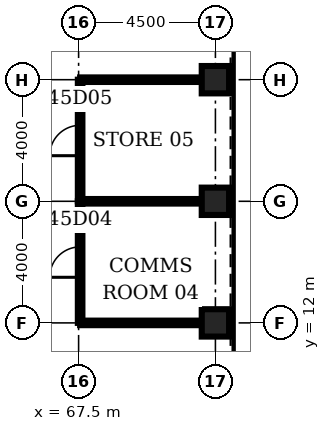
"""IFC4 building model, lengths in metres.
Left out: names, types, materials, properties, quantities, classifications, styles, units other than length and angle.
Written with IfcOpenShell. Run it as: python <this file> out.ifc"""

import sys

from ifc_helpers import new_model, si_unit, direction, frame, frame_2d, origin, origin_2d, place, context, subcontext, project, spatial, rectangle, hollow_rectangle, extrude, element, fill, save


model = new_model("IFC4")
c1 = context("Model", 3, precision=1e-05, world=origin(), true_north=direction((0.0, 1.0)))
c2 = subcontext(c1, "Body", "Model", "MODEL_VIEW")
j1 = project(units=[si_unit("LENGTHUNIT", "METRE"), si_unit("PLANEANGLEUNIT", "RADIAN")], contexts=[c1])
p1 = place(None, origin())
s1 = spatial("IfcSite", under=j1, at=p1, CompositionType="ELEMENT")
p2 = place(p1, origin())
s2 = spatial("IfcBuilding", under=s1, at=p2, CompositionType="ELEMENT")
p3 = place(p2, frame((0.0, 0.0, 202.6)))
s3 = spatial("IfcBuildingStorey", under=s2, at=p3, CompositionType="ELEMENT", Elevation=202.6)
for number, where, z_axis, x_axis in (
    (1, (72.0, 12.0, 0.0), (0.0, 0.0, 1.0), (1.0, 0.0, 0.0)),
    (2, (72.0, 16.0, 0.0), (0.0, 0.0, 1.0), (1.0, 0.0, 0.0)),
    (3, (72.0, 20.0, 0.0), (0.0, 0.0, 1.0), (1.0, 0.0, 0.0)),
):
    element("IfcColumn", number, at=place(p3, frame(where, z_axis=z_axis, x_axis=x_axis)), inside=s3, PredefinedType="COLUMN", context=c2, shape_type="SweptSolid", body=[
        extrude(hollow_rectangle(XDim=0.9, YDim=0.9, WallThickness=0.09, at=origin_2d()), origin(), (0.0, 0.0, 1.0), 4.2),
    ])
for number, where, z_axis, x_axis in (
    (4, (67.55, 12.0, 0.0), (0.0, 0.0, 1.0), (1.0, 0.0, 0.0)),
    (5, (67.55, 16.0, 0.0), (0.0, 0.0, 1.0), (1.0, 0.0, 0.0)),
    (6, (67.55, 20.0, 0.0), (0.0, 0.0, 1.0), (1.0, 0.0, 0.0)),
):
    element("IfcWall", number, at=place(p3, frame(where, z_axis=z_axis, x_axis=x_axis)), inside=s3, PredefinedType="PARTITIONING", context=c2, shape_type="SweptSolid", body=[
        extrude(rectangle(XDim=4.0, YDim=0.15, at=frame_2d((2.0, 0.0))), origin(), (0.0, 0.0, 1.0), 3.0),
    ])
p4 = place(p3, frame((67.55, 12.0, 0.0), z_axis=(0.0, 0.0, 1.0), x_axis=(0.0, 1.0, 0.0)))
e7 = element("IfcWall", 7, at=p4, inside=s3, PredefinedType="PARTITIONING", context=c2, shape_type="SweptSolid", body=[
    extrude(rectangle(XDim=4.0, YDim=0.15, at=frame_2d((2.0, 0.0))), origin(), (0.0, 0.0, 1.0), 3.0),
])
p5 = place(p4, frame((1.5, 0.0, 0.0)))
e8 = element("IfcOpeningElement", 8, at=p5, cuts=e7, PredefinedType="OPENING", context=c2, shape_type="SweptSolid", body=[
    extrude(rectangle(XDim=1.0, YDim=2.1, at=frame_2d((0.5, 1.05))), frame((0.0, 0.085, 0.0), z_axis=(0.0, -1.0, 0.0), x_axis=(1.0, 0.0, 0.0)), (0.0, 0.0, 1.0), 0.17),
])
p6 = place(p3, frame((67.55, 16.0, 0.0), z_axis=(0.0, 0.0, 1.0), x_axis=(0.0, 1.0, 0.0)))
e9 = element("IfcWall", 9, at=p6, inside=s3, PredefinedType="PARTITIONING", context=c2, shape_type="SweptSolid", body=[
    extrude(rectangle(XDim=4.0, YDim=0.15, at=frame_2d((2.0, 0.0))), origin(), (0.0, 0.0, 1.0), 3.0),
])
p7 = place(p6, frame((1.5, 0.0, 0.0)))
e10 = element("IfcOpeningElement", 10, at=p7, cuts=e9, PredefinedType="OPENING", context=c2, shape_type="SweptSolid", body=[
    extrude(rectangle(XDim=1.0, YDim=2.1, at=frame_2d((0.5, 1.05))), frame((0.0, 0.085, 0.0), z_axis=(0.0, -1.0, 0.0), x_axis=(1.0, 0.0, 0.0)), (0.0, 0.0, 1.0), 0.17),
])
p8 = place(p5, origin())
e11 = element("IfcDoor", 11, at=p8, inside=s3, OperationType="SINGLE_SWING_LEFT", PredefinedType="DOOR", context=c2, shape_type="SweptSolid", body=[
    extrude(rectangle(XDim=1.0, YDim=2.1, at=frame_2d((0.5, 1.05))), frame((0.0, 0.025, 0.0), z_axis=(0.0, -1.0, 0.0), x_axis=(1.0, 0.0, 0.0)), (0.0, 0.0, 1.0), 0.05),
])
fill(e8, e11)
p9 = place(p7, origin())
e12 = element("IfcDoor", 12, at=p9, inside=s3, OperationType="SINGLE_SWING_LEFT", PredefinedType="DOOR", context=c2, shape_type="SweptSolid", body=[
    extrude(rectangle(XDim=1.0, YDim=2.1, at=frame_2d((0.5, 1.05))), frame((0.0, 0.025, 0.0), z_axis=(0.0, -1.0, 0.0), x_axis=(1.0, 0.0, 0.0)), (0.0, 0.0, 1.0), 0.05),
])
fill(e10, e12)
save(model, sys.argv[1])
